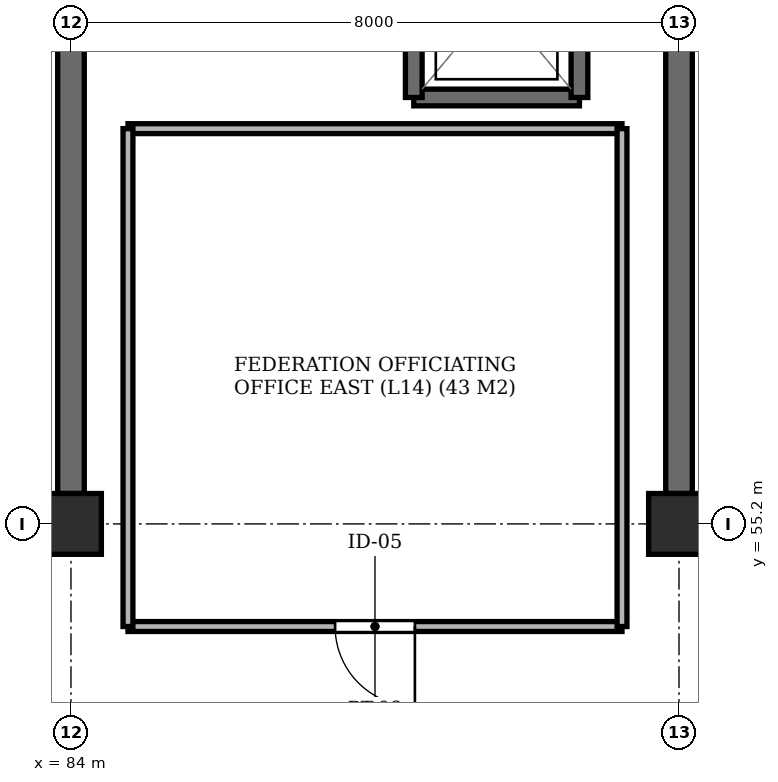
"""IFC4 building model, lengths in metres.
Left out: names, types, materials, properties, quantities, classifications, styles, units other than length and angle.
Written with IfcOpenShell. Run it as: python <this file> out.ifc"""

import sys

from ifc_helpers import new_model, si_unit, direction, frame, frame_2d, origin, origin_2d, place, context, subcontext, project, spatial, rectangle, extrude, element, fill, save


model = new_model("IFC4")
c1 = context("Model", 3, precision=1e-05, world=origin(), true_north=direction((0.0, 1.0)))
c2 = subcontext(c1, "Body", "Model", "MODEL_VIEW")
j1 = project(units=[si_unit("LENGTHUNIT", "METRE"), si_unit("PLANEANGLEUNIT", "RADIAN")], contexts=[c1])
p1 = place(None, origin())
s1 = spatial("IfcSite", under=j1, at=p1, CompositionType="ELEMENT")
p2 = place(p1, origin())
s2 = spatial("IfcBuilding", under=s1, at=p2, CompositionType="ELEMENT")
p3 = place(p2, frame((0.0, 0.0, 56.8)))
s3 = spatial("IfcBuildingStorey", under=s2, at=p3, CompositionType="ELEMENT", Elevation=56.8)
for number, where, z_axis, x_axis in (
    (1, (84.0, 55.2, -0.22), (0.0, 0.0, 1.0), (1.0, 0.0, 0.0)),
    (2, (92.0, 55.2, -0.22), (0.0, 0.0, 1.0), (1.0, 0.0, 0.0)),
):
    element("IfcColumn", number, at=place(p3, frame(where, z_axis=z_axis, x_axis=x_axis)), inside=s3, PredefinedType="COLUMN", context=c2, shape_type="SweptSolid", body=[
        extrude(rectangle(XDim=0.8, YDim=0.8, at=origin_2d()), origin(), (0.0, 0.0, 1.0), 3.26),
    ])
for number, where, z_axis, x_axis in (
    (3, (84.0, 55.6, 0.0), (0.0, 0.0, 1.0), (0.0, 1.0, 0.0)),
    (4, (92.0, 55.6, 0.0), (0.0, 0.0, 1.0), (0.0, 1.0, 0.0)),
):
    element("IfcWall", number, at=place(p3, frame(where, z_axis=z_axis, x_axis=x_axis)), inside=s3, PredefinedType="SHEAR", context=c2, shape_type="SweptSolid", body=[
        extrude(rectangle(XDim=6.45, YDim=0.35, at=frame_2d((3.225, 0.0))), origin(), (0.0, 0.0, 1.0), 3.04),
    ])
p4 = place(p3, frame((88.51, 60.81, 0.0), z_axis=(0.0, 0.0, 1.0), x_axis=(1.0, 0.0, 0.0)))
e5 = element("IfcWall", 5, at=p4, inside=s3, PredefinedType="SHEAR", context=c2, shape_type="SweptSolid", body=[
    extrude(rectangle(XDim=2.18, YDim=0.22, at=frame_2d((1.09, 0.0))), origin(), (0.0, 0.0, 1.0), 3.04),
])
for number, where, z_axis, x_axis in (
    (6, (88.51, 63.39, 0.0), (0.0, 0.0, 1.0), (0.0, -1.0, 0.0)),
    (7, (90.69, 60.81, 0.0), (0.0, 0.0, 1.0), (0.0, 1.0, 0.0)),
):
    element("IfcWall", number, at=place(p3, frame(where, z_axis=z_axis, x_axis=x_axis)), inside=s3, PredefinedType="SHEAR", context=c2, shape_type="SweptSolid", body=[
        extrude(rectangle(XDim=2.58, YDim=0.22, at=frame_2d((1.29, 0.0))), origin(), (0.0, 0.0, 1.0), 3.04),
    ])
p5 = place(p3, frame((84.75, 53.85, 0.0), z_axis=(0.0, 0.0, 1.0), x_axis=(1.0, 0.0, 0.0)))
e8 = element("IfcWall", 8, at=p5, inside=s3, PredefinedType="PARTITIONING", context=c2, shape_type="SweptSolid", body=[
    extrude(rectangle(XDim=6.5, YDim=0.13, at=frame_2d((3.25, 0.0))), origin(), (0.0, 0.0, 1.0), 2.53),
])
p6 = place(p5, frame((2.725, 0.0, 0.0)))
e9 = element("IfcOpeningElement", 9, at=p6, cuts=e8, PredefinedType="OPENING", context=c2, shape_type="SweptSolid", body=[
    extrude(rectangle(XDim=1.05, YDim=2.15, at=frame_2d((0.525, 1.075))), frame((0.0, 0.077, 0.0), z_axis=(0.0, -1.0, 0.0), x_axis=(1.0, 0.0, 0.0)), (0.0, 0.0, 1.0), 0.154),
])
p7 = place(p3, frame((84.75, 60.4, 0.0), z_axis=(0.0, 0.0, 1.0), x_axis=(1.0, 0.0, 0.0)))
e10 = element("IfcWall", 10, at=p7, inside=s3, PredefinedType="PARTITIONING", context=c2, shape_type="SweptSolid", body=[
    extrude(rectangle(XDim=6.5, YDim=0.13, at=frame_2d((3.25, 0.0))), origin(), (0.0, 0.0, 1.0), 2.53),
])
for number, where, z_axis, x_axis in (
    (11, (84.75, 53.85, 0.0), (0.0, 0.0, 1.0), (0.0, 1.0, 0.0)),
    (12, (91.25, 53.85, 0.0), (0.0, 0.0, 1.0), (0.0, 1.0, 0.0)),
):
    element("IfcWall", number, at=place(p3, frame(where, z_axis=z_axis, x_axis=x_axis)), inside=s3, PredefinedType="PARTITIONING", context=c2, shape_type="SweptSolid", body=[
        extrude(rectangle(XDim=6.55, YDim=0.13, at=frame_2d((3.275, 0.0))), origin(), (0.0, 0.0, 1.0), 2.53),
    ])
p8 = place(p6, frame((1.05, 0.0, 0.0), z_axis=(0.0, 0.0, 1.0), x_axis=(-1.0, 0.0, 0.0)))
e13 = element("IfcDoor", 13, at=p8, inside=s3, OperationType="SINGLE_SWING_RIGHT", PredefinedType="DOOR", context=c2, shape_type="SweptSolid", body=[
    extrude(rectangle(XDim=1.05, YDim=2.15, at=frame_2d((0.525, 1.075))), frame((0.0, 0.025, 0.0), z_axis=(0.0, -1.0, 0.0), x_axis=(1.0, 0.0, 0.0)), (0.0, 0.0, 1.0), 0.05),
])
fill(e9, e13)
save(model, sys.argv[1])
